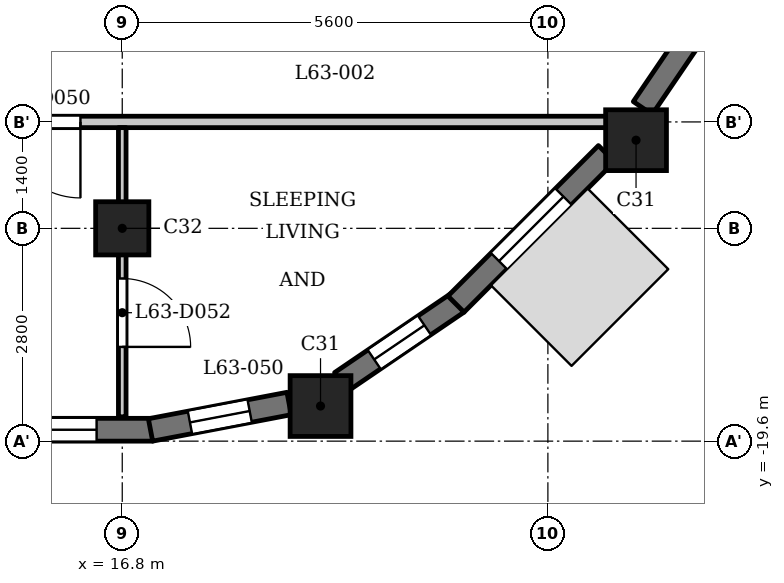
"""IFC4 building model, lengths in metres.
Left out: names, types, materials, properties, quantities, classifications, styles, units other than length and angle.
Written with IfcOpenShell. Run it as: python <this file> out.ifc"""

import sys

from ifc_helpers import new_model, si_unit, direction, frame, frame_2d, origin, origin_2d, place, context, subcontext, project, spatial, rectangle, extrude, element, fill, save


model = new_model("IFC4")
c1 = context("Model", 3, precision=1e-05, world=origin(), true_north=direction((0.0, 1.0)))
c2 = subcontext(c1, "Body", "Model", "MODEL_VIEW")
j1 = project(units=[si_unit("LENGTHUNIT", "METRE"), si_unit("PLANEANGLEUNIT", "RADIAN")], contexts=[c1])
p1 = place(None, origin())
s1 = spatial("IfcSite", under=j1, at=p1, CompositionType="ELEMENT")
p2 = place(p1, origin())
s2 = spatial("IfcBuilding", under=s1, at=p2, CompositionType="ELEMENT")
p3 = place(p2, frame((0.0, 0.0, 245.2)))
s3 = spatial("IfcBuildingStorey", under=s2, at=p3, CompositionType="ELEMENT", Elevation=245.2)
for number, where, z_axis, x_axis in (
    (1, (19.409, -19.138, 0.0), (0.0, 0.0, 1.0), (1.0, 0.0, 0.0)),
    (2, (23.56, -15.64, 0.0), (0.0, 0.0, 1.0), (1.0, 0.0, 0.0)),
):
    element("IfcColumn", number, at=place(p3, frame(where, z_axis=z_axis, x_axis=x_axis)), inside=s3, PredefinedType="COLUMN", context=c2, shape_type="SweptSolid", body=[
        extrude(rectangle(XDim=0.8, YDim=0.8, at=origin_2d()), origin(), (0.0, 0.0, 1.0), 3.5),
    ])
p4 = place(p3, frame((16.8, -16.8, 0.0), z_axis=(0.0, 0.0, 1.0), x_axis=(1.0, 0.0, 0.0)))
e3 = element("IfcColumn", 3, at=p4, inside=s3, PredefinedType="COLUMN", context=c2, shape_type="SweptSolid", body=[
    extrude(rectangle(XDim=0.7, YDim=0.7, at=origin_2d()), origin(), (0.0, 0.0, 1.0), 3.5),
])
p5 = place(p3, frame((14.4, -19.45, 0.0), z_axis=(0.0, 0.0, 1.0), x_axis=(1.0, 0.0, 0.0)))
e4 = element("IfcWall", 4, at=p5, inside=s3, PredefinedType="SOLIDWALL", context=c2, shape_type="SweptSolid", body=[
    extrude(rectangle(XDim=2.8, YDim=0.3, at=frame_2d((1.4, 0.0))), origin(), (0.0, 0.0, 1.0), 2.55),
])
p6 = place(p5, frame((0.262, 0.0, 0.9)))
e5 = element("IfcOpeningElement", 5, at=p6, cuts=e4, PredefinedType="OPENING", context=c2, shape_type="SweptSolid", body=[
    extrude(rectangle(XDim=1.8, YDim=1.25, at=frame_2d((0.9, 0.625))), frame((0.0, 0.16, 0.0), z_axis=(0.0, -1.0, 0.0), x_axis=(1.0, 0.0, 0.0)), (0.0, 0.0, 1.0), 0.32),
])
p7 = place(p3, frame((17.172, -19.453, 0.0), z_axis=(0.0, 0.0, 1.0), x_axis=(0.982301706131, 0.187305520826, 0.0)))
e6 = element("IfcWall", 6, at=p7, inside=s3, PredefinedType="SOLIDWALL", context=c2, shape_type="SweptSolid", body=[
    extrude(rectangle(XDim=1.856, YDim=0.3, at=frame_2d((0.928, 0.0))), origin(), (0.0, 0.0, 1.0), 2.55),
])
p8 = place(p7, frame((0.528, 0.0, 0.6)))
e7 = element("IfcOpeningElement", 7, at=p8, cuts=e6, PredefinedType="OPENING", context=c2, shape_type="SweptSolid", body=[
    extrude(rectangle(XDim=0.8, YDim=1.55, at=frame_2d((0.4, 0.775))), frame((0.0, 0.16, 0.0), z_axis=(0.0, -1.0, 0.0), x_axis=(1.0, 0.0, 0.0)), (0.0, 0.0, 1.0), 0.32),
])
p9 = place(p3, frame((19.678, -18.822, 0.0), z_axis=(0.0, 0.0, 1.0), x_axis=(0.826997446962, 0.562205676526, 0.0)))
e8 = element("IfcWall", 8, at=p9, inside=s3, PredefinedType="SOLIDWALL", context=c2, shape_type="SweptSolid", body=[
    extrude(rectangle(XDim=1.856, YDim=0.3, at=frame_2d((0.928, 0.0))), origin(), (0.0, 0.0, 1.0), 2.55),
])
p10 = place(p9, frame((0.528, 0.0, 0.6)))
e9 = element("IfcOpeningElement", 9, at=p10, cuts=e8, PredefinedType="OPENING", context=c2, shape_type="SweptSolid", body=[
    extrude(rectangle(XDim=0.8, YDim=1.55, at=frame_2d((0.4, 0.775))), frame((0.0, 0.16, 0.0), z_axis=(0.0, -1.0, 0.0), x_axis=(1.0, 0.0, 0.0)), (0.0, 0.0, 1.0), 0.32),
])
p11 = place(p3, frame((21.191, -17.797, 0.0), z_axis=(0.0, 0.0, 1.0), x_axis=(0.707106781187, 0.707106781187, 0.0)))
e10 = element("IfcWall", 10, at=p11, inside=s3, PredefinedType="SOLIDWALL", context=c2, shape_type="SweptSolid", body=[
    extrude(rectangle(XDim=2.8, YDim=0.3, at=frame_2d((1.4, 0.0))), origin(), (0.0, 0.0, 1.0), 2.55),
])
p12 = place(p11, frame((0.8, 0.0, 0.6)))
e11 = element("IfcOpeningElement", 11, at=p12, cuts=e10, PredefinedType="OPENING", context=c2, shape_type="SweptSolid", body=[
    extrude(rectangle(XDim=1.2, YDim=1.55, at=frame_2d((0.6, 0.775))), frame((0.0, 0.16, 0.0), z_axis=(0.0, -1.0, 0.0), x_axis=(1.0, 0.0, 0.0)), (0.0, 0.0, 1.0), 0.32),
])
p13 = place(p3, frame((23.648, -15.217, 0.0), z_axis=(0.0, 0.0, 1.0), x_axis=(0.562043265151, 0.827107833416, 0.0)))
e12 = element("IfcWall", 12, at=p13, inside=s3, PredefinedType="SOLIDWALL", context=c2, shape_type="SweptSolid", body=[
    extrude(rectangle(XDim=1.377, YDim=0.3, at=frame_2d((0.688, 0.0))), origin(), (0.0, 0.0, 1.0), 2.55),
])
p14 = place(p3, frame((-23.322, -15.4, 0.0), z_axis=(0.0, 0.0, 1.0), x_axis=(1.0, 0.0, 0.0)))
e13 = element("IfcWall", 13, at=p14, inside=s3, PredefinedType="PARTITIONING", context=c2, shape_type="SweptSolid", body=[
    extrude(rectangle(XDim=46.872, YDim=0.15, at=frame_2d((23.436, 0.0))), origin(), (0.0, 0.0, 1.0), 3.2),
])
p15 = place(p14, frame((7.172, 0.0, 0.0)))
e14 = element("IfcOpeningElement", 14, at=p15, cuts=e13, PredefinedType="OPENING", context=c2, shape_type="SweptSolid", body=[
    extrude(rectangle(XDim=1.0, YDim=2.1, at=frame_2d((0.5, 1.05))), frame((0.0, 0.085, 0.0), z_axis=(0.0, -1.0, 0.0), x_axis=(1.0, 0.0, 0.0)), (0.0, 0.0, 1.0), 0.17),
])
p16 = place(p14, frame((16.172, 0.0, 0.0)))
e15 = element("IfcOpeningElement", 15, at=p16, cuts=e13, PredefinedType="OPENING", context=c2, shape_type="SweptSolid", body=[
    extrude(rectangle(XDim=1.0, YDim=2.1, at=frame_2d((0.5, 1.05))), frame((0.0, 0.085, 0.0), z_axis=(0.0, -1.0, 0.0), x_axis=(1.0, 0.0, 0.0)), (0.0, 0.0, 1.0), 0.17),
])
p17 = place(p14, frame((26.372, 0.0, 0.0)))
e16 = element("IfcOpeningElement", 16, at=p17, cuts=e13, PredefinedType="OPENING", context=c2, shape_type="SweptSolid", body=[
    extrude(rectangle(XDim=1.0, YDim=2.1, at=frame_2d((0.5, 1.05))), frame((0.0, 0.085, 0.0), z_axis=(0.0, -1.0, 0.0), x_axis=(1.0, 0.0, 0.0)), (0.0, 0.0, 1.0), 0.17),
])
p18 = place(p14, frame((38.572, 0.0, 0.0)))
e17 = element("IfcOpeningElement", 17, at=p18, cuts=e13, PredefinedType="OPENING", context=c2, shape_type="SweptSolid", body=[
    extrude(rectangle(XDim=1.0, YDim=2.1, at=frame_2d((0.5, 1.05))), frame((0.0, 0.085, 0.0), z_axis=(0.0, -1.0, 0.0), x_axis=(1.0, 0.0, 0.0)), (0.0, 0.0, 1.0), 0.17),
])
p19 = place(p3, frame((16.8, -19.28, 0.0), z_axis=(0.0, 0.0, 1.0), x_axis=(0.0, 1.0, 0.0)))
e18 = element("IfcWall", 18, at=p19, inside=s3, PredefinedType="PARTITIONING", context=c2, shape_type="SweptSolid", body=[
    extrude(rectangle(XDim=3.805, YDim=0.1, at=frame_2d((1.902, 0.0))), origin(), (0.0, 0.0, 1.0), 3.2),
])
p20 = place(p19, frame((0.92, 0.0, 0.0)))
e19 = element("IfcOpeningElement", 19, at=p20, cuts=e18, PredefinedType="OPENING", context=c2, shape_type="SweptSolid", body=[
    extrude(rectangle(XDim=0.9, YDim=2.1, at=frame_2d((0.45, 1.05))), frame((0.0, 0.06, 0.0), z_axis=(0.0, -1.0, 0.0), x_axis=(1.0, 0.0, 0.0)), (0.0, 0.0, 1.0), 0.12),
])
p21 = place(p18, origin())
e20 = element("IfcDoor", 20, at=p21, inside=s3, OperationType="SINGLE_SWING_RIGHT", PredefinedType="DOOR", context=c2, shape_type="SweptSolid", body=[
    extrude(rectangle(XDim=1.0, YDim=2.1, at=frame_2d((0.5, 1.05))), frame((0.0, 0.025, 0.0), z_axis=(0.0, -1.0, 0.0), x_axis=(1.0, 0.0, 0.0)), (0.0, 0.0, 1.0), 0.05),
])
fill(e17, e20)
p22 = place(p20, origin())
e21 = element("IfcDoor", 21, at=p22, inside=s3, OperationType="SINGLE_SWING_LEFT", PredefinedType="DOOR", context=c2, shape_type="SweptSolid", body=[
    extrude(rectangle(XDim=0.9, YDim=2.1, at=frame_2d((0.45, 1.05))), frame((0.0, 0.025, 0.0), z_axis=(0.0, -1.0, 0.0), x_axis=(1.0, 0.0, 0.0)), (0.0, 0.0, 1.0), 0.05),
])
fill(e19, e21)
p23 = place(p6, origin())
e22 = element("IfcWindow", 22, at=p23, inside=s3, PartitioningType="SINGLE_PANEL", PredefinedType="WINDOW", context=c2, shape_type="SweptSolid", body=[
    extrude(rectangle(XDim=1.8, YDim=1.25, at=frame_2d((0.9, 0.625))), frame((0.0, 0.03, 0.0), z_axis=(0.0, -1.0, 0.0), x_axis=(1.0, 0.0, 0.0)), (0.0, 0.0, 1.0), 0.06),
])
fill(e5, e22)
p24 = place(p8, origin())
e23 = element("IfcWindow", 23, at=p24, inside=s3, PartitioningType="SINGLE_PANEL", PredefinedType="WINDOW", context=c2, shape_type="SweptSolid", body=[
    extrude(rectangle(XDim=0.8, YDim=1.55, at=frame_2d((0.4, 0.775))), frame((0.0, 0.03, 0.0), z_axis=(0.0, -1.0, 0.0), x_axis=(1.0, 0.0, 0.0)), (0.0, 0.0, 1.0), 0.06),
])
fill(e7, e23)
p25 = place(p10, origin())
e24 = element("IfcWindow", 24, at=p25, inside=s3, PartitioningType="SINGLE_PANEL", PredefinedType="WINDOW", context=c2, shape_type="SweptSolid", body=[
    extrude(rectangle(XDim=0.8, YDim=1.55, at=frame_2d((0.4, 0.775))), frame((0.0, 0.03, 0.0), z_axis=(0.0, -1.0, 0.0), x_axis=(1.0, 0.0, 0.0)), (0.0, 0.0, 1.0), 0.06),
])
fill(e9, e24)
p26 = place(p12, origin())
e25 = element("IfcWindow", 25, at=p26, inside=s3, PartitioningType="SINGLE_PANEL", PredefinedType="WINDOW", context=c2, shape_type="SweptSolid", body=[
    extrude(rectangle(XDim=1.2, YDim=1.55, at=frame_2d((0.6, 0.775))), frame((0.0, 0.03, 0.0), z_axis=(0.0, -1.0, 0.0), x_axis=(1.0, 0.0, 0.0)), (0.0, 0.0, 1.0), 0.06),
])
fill(e11, e25)
save(model, sys.argv[1])
